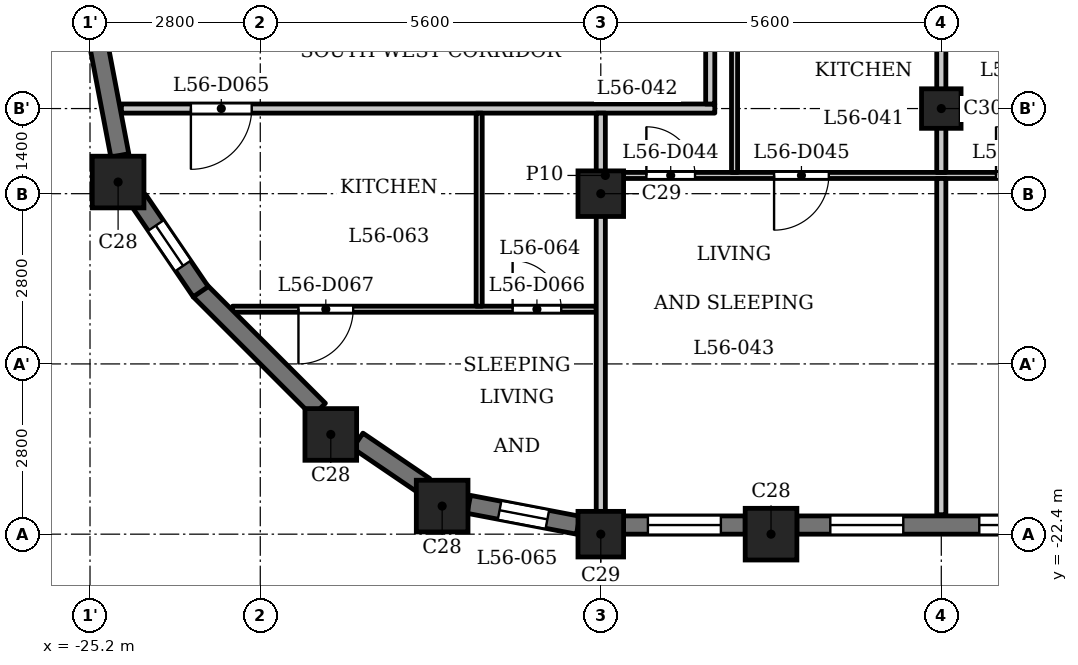
"""IFC4 building model, lengths in metres.
Left out: names, types, materials, properties, quantities, classifications, styles, units other than length and angle.
Written with IfcOpenShell. Run it as: python <this file> out.ifc"""

import sys

from ifc_helpers import new_model, si_unit, direction, frame, frame_2d, origin, origin_2d, place, context, subcontext, project, spatial, rectangle, extrude, element, fill, save


model = new_model("IFC4")
c1 = context("Model", 3, precision=1e-05, world=origin(), true_north=direction((0.0, 1.0)))
c2 = subcontext(c1, "Body", "Model", "MODEL_VIEW")
j1 = project(units=[si_unit("LENGTHUNIT", "METRE"), si_unit("PLANEANGLEUNIT", "RADIAN")], contexts=[c1])
p1 = place(None, origin())
s1 = spatial("IfcSite", under=j1, at=p1, CompositionType="ELEMENT")
p2 = place(p1, origin())
s2 = spatial("IfcBuilding", under=s1, at=p2, CompositionType="ELEMENT")
p3 = place(p2, frame((0.0, 0.0, 216.9)))
s3 = spatial("IfcBuildingStorey", under=s2, at=p3, CompositionType="ELEMENT", Elevation=216.9)
for number, where, z_axis, x_axis in (
    (1, (-19.409, -21.938, 0.0), (0.0, 0.0, 1.0), (1.0, 0.0, 0.0)),
    (2, (-14.0, -22.4, 0.0), (0.0, 0.0, 1.0), (1.0, 0.0, 0.0)),
    (3, (-24.738, -16.609, 0.0), (0.0, 0.0, 1.0), (1.0, 0.0, 0.0)),
    (4, (-21.24, -20.76, 0.0), (0.0, 0.0, 1.0), (1.0, 0.0, 0.0)),
):
    element("IfcColumn", number, at=place(p3, frame(where, z_axis=z_axis, x_axis=x_axis)), inside=s3, PredefinedType="COLUMN", context=c2, shape_type="SweptSolid", body=[
        extrude(rectangle(XDim=0.85, YDim=0.85, at=origin_2d()), origin(), (0.0, 0.0, 1.0), 3.5),
    ])
for number, where, z_axis, x_axis in (
    (5, (-16.8, -22.4, 0.0), (0.0, 0.0, 1.0), (1.0, 0.0, 0.0)),
    (6, (-16.8, -16.8, 0.0), (0.0, 0.0, 1.0), (1.0, 0.0, 0.0)),
):
    element("IfcColumn", number, at=place(p3, frame(where, z_axis=z_axis, x_axis=x_axis)), inside=s3, PredefinedType="COLUMN", context=c2, shape_type="SweptSolid", body=[
        extrude(rectangle(XDim=0.75, YDim=0.75, at=origin_2d()), origin(), (0.0, 0.0, 1.0), 3.5),
    ])
p4 = place(p3, frame((-11.2, -15.4, 0.0), z_axis=(0.0, 0.0, 1.0), x_axis=(1.0, 0.0, 0.0)))
e7 = element("IfcColumn", 7, at=p4, inside=s3, PredefinedType="COLUMN", context=c2, shape_type="SweptSolid", body=[
    extrude(rectangle(XDim=0.65, YDim=0.65, at=origin_2d()), origin(), (0.0, 0.0, 1.0), 3.5),
])
p5 = place(p3, frame((-23.397, -18.391, 0.0), z_axis=(0.0, 0.0, 1.0), x_axis=(0.707106781187, -0.707106781187, 0.0)))
e8 = element("IfcWall", 8, at=p5, inside=s3, PredefinedType="SOLIDWALL", context=c2, shape_type="SweptSolid", body=[
    extrude(rectangle(XDim=2.775, YDim=0.3, at=frame_2d((1.388, 0.0))), origin(), (0.0, 0.0, 1.0), 2.5),
])
p6 = place(p3, frame((-20.796, -20.862, 0.0), z_axis=(0.0, 0.0, 1.0), x_axis=(0.827035970432, -0.562149004813, 0.0)))
e9 = element("IfcWall", 9, at=p6, inside=s3, PredefinedType="SOLIDWALL", context=c2, shape_type="SweptSolid", body=[
    extrude(rectangle(XDim=1.327, YDim=0.3, at=frame_2d((0.664, 0.0))), origin(), (0.0, 0.0, 1.0), 2.5),
])
p7 = place(p3, frame((-18.971, -21.91, 0.0), z_axis=(0.0, 0.0, 1.0), x_axis=(0.982300037503, -0.187314271538, 0.0)))
e10 = element("IfcWall", 10, at=p7, inside=s3, PredefinedType="SOLIDWALL", context=c2, shape_type="SweptSolid", body=[
    extrude(rectangle(XDim=1.831, YDim=0.3, at=frame_2d((0.916, 0.0))), origin(), (0.0, 0.0, 1.0), 2.5),
])
p8 = place(p7, frame((0.516, 0.0, 0.6)))
e11 = element("IfcOpeningElement", 11, at=p8, cuts=e10, PredefinedType="OPENING", context=c2, shape_type="SweptSolid", body=[
    extrude(rectangle(XDim=0.8, YDim=1.55, at=frame_2d((0.4, 0.775))), frame((0.0, 0.16, 0.0), z_axis=(0.0, -1.0, 0.0), x_axis=(1.0, 0.0, 0.0)), (0.0, 0.0, 1.0), 0.32),
])
p9 = place(p3, frame((-16.425, -22.25, 0.0), z_axis=(0.0, 0.0, 1.0), x_axis=(1.0, 0.0, 0.0)))
e12 = element("IfcWall", 12, at=p9, inside=s3, PredefinedType="SOLIDWALL", context=c2, shape_type="SweptSolid", body=[
    extrude(rectangle(XDim=2.0, YDim=0.3, at=frame_2d((1.0, 0.0))), origin(), (0.0, 0.0, 1.0), 2.5),
])
p10 = place(p9, frame((0.4, 0.0, 0.6)))
e13 = element("IfcOpeningElement", 13, at=p10, cuts=e12, PredefinedType="OPENING", context=c2, shape_type="SweptSolid", body=[
    extrude(rectangle(XDim=1.2, YDim=1.55, at=frame_2d((0.6, 0.775))), frame((0.0, 0.16, 0.0), z_axis=(0.0, -1.0, 0.0), x_axis=(1.0, 0.0, 0.0)), (0.0, 0.0, 1.0), 0.32),
])
p11 = place(p3, frame((-13.575, -22.25, 0.0), z_axis=(0.0, 0.0, 1.0), x_axis=(1.0, 0.0, 0.0)))
e14 = element("IfcWall", 14, at=p11, inside=s3, PredefinedType="SOLIDWALL", context=c2, shape_type="SweptSolid", body=[
    extrude(rectangle(XDim=4.75, YDim=0.3, at=frame_2d((2.375, 0.0))), origin(), (0.0, 0.0, 1.0), 2.5),
])
p12 = place(p11, frame((0.55, 0.0, 0.6)))
e15 = element("IfcOpeningElement", 15, at=p12, cuts=e14, PredefinedType="OPENING", context=c2, shape_type="SweptSolid", body=[
    extrude(rectangle(XDim=1.2, YDim=1.55, at=frame_2d((0.6, 0.775))), frame((0.0, 0.16, 0.0), z_axis=(0.0, -1.0, 0.0), x_axis=(1.0, 0.0, 0.0)), (0.0, 0.0, 1.0), 0.32),
])
p13 = place(p11, frame((3.0, 0.0, 0.6)))
e16 = element("IfcOpeningElement", 16, at=p13, cuts=e14, PredefinedType="OPENING", context=c2, shape_type="SweptSolid", body=[
    extrude(rectangle(XDim=1.2, YDim=1.55, at=frame_2d((0.6, 0.775))), frame((0.0, 0.16, 0.0), z_axis=(0.0, -1.0, 0.0), x_axis=(1.0, 0.0, 0.0)), (0.0, 0.0, 1.0), 0.32),
])
p14 = place(p3, frame((-25.053, -14.372, 0.0), z_axis=(0.0, 0.0, 1.0), x_axis=(0.187442908742, -0.982275499014, 0.0)))
e17 = element("IfcWall", 17, at=p14, inside=s3, PredefinedType="SOLIDWALL", context=c2, shape_type="SweptSolid", body=[
    extrude(rectangle(XDim=1.831, YDim=0.3, at=frame_2d((0.916, 0.0))), origin(), (0.0, 0.0, 1.0), 2.5),
])
p15 = place(p3, frame((-24.408, -16.898, 0.0), z_axis=(0.0, 0.0, 1.0), x_axis=(0.562062033417, -0.827095079535, 0.0)))
e18 = element("IfcWall", 18, at=p15, inside=s3, PredefinedType="SOLIDWALL", context=c2, shape_type="SweptSolid", body=[
    extrude(rectangle(XDim=1.831, YDim=0.3, at=frame_2d((0.916, 0.0))), origin(), (0.0, 0.0, 1.0), 2.5),
])
p16 = place(p15, frame((0.516, 0.0, 0.6)))
e19 = element("IfcOpeningElement", 19, at=p16, cuts=e18, PredefinedType="OPENING", context=c2, shape_type="SweptSolid", body=[
    extrude(rectangle(XDim=0.8, YDim=1.55, at=frame_2d((0.4, 0.775))), frame((0.0, 0.16, 0.0), z_axis=(0.0, -1.0, 0.0), x_axis=(1.0, 0.0, 0.0)), (0.0, 0.0, 1.0), 0.32),
])
p17 = place(p3, frame((-22.856, -18.7, 0.0), z_axis=(0.0, 0.0, 1.0), x_axis=(1.0, 0.0, 0.0)))
e20 = element("IfcWall", 20, at=p17, inside=s3, PredefinedType="PARTITIONING", context=c2, shape_type="SweptSolid", body=[
    extrude(rectangle(XDim=5.981, YDim=0.1, at=frame_2d((2.99, 0.0))), origin(), (0.0, 0.0, 1.0), 3.2),
])
p18 = place(p17, frame((4.606, 0.0, 0.0)))
e21 = element("IfcOpeningElement", 21, at=p18, cuts=e20, PredefinedType="OPENING", context=c2, shape_type="SweptSolid", body=[
    extrude(rectangle(XDim=0.8, YDim=2.1, at=frame_2d((0.4, 1.05))), frame((0.0, 0.06, 0.0), z_axis=(0.0, -1.0, 0.0), x_axis=(1.0, 0.0, 0.0)), (0.0, 0.0, 1.0), 0.12),
])
p19 = place(p17, frame((1.084, 0.0, 0.0)))
e22 = element("IfcOpeningElement", 22, at=p19, cuts=e20, PredefinedType="OPENING", context=c2, shape_type="SweptSolid", body=[
    extrude(rectangle(XDim=0.9, YDim=2.1, at=frame_2d((0.45, 1.05))), frame((0.0, 0.06, 0.0), z_axis=(0.0, -1.0, 0.0), x_axis=(1.0, 0.0, 0.0)), (0.0, 0.0, 1.0), 0.12),
])
p20 = place(p3, frame((-16.725, -16.5, 0.0), z_axis=(0.0, 0.0, 1.0), x_axis=(1.0, 0.0, 0.0)))
e23 = element("IfcWall", 23, at=p20, inside=s3, PredefinedType="PARTITIONING", context=c2, shape_type="SweptSolid", body=[
    extrude(rectangle(XDim=33.45, YDim=0.1, at=frame_2d((16.725, 0.0))), origin(), (0.0, 0.0, 1.0), 3.2),
])
p21 = place(p20, frame((0.675, 0.0, 0.0)))
e24 = element("IfcOpeningElement", 24, at=p21, cuts=e23, PredefinedType="OPENING", context=c2, shape_type="SweptSolid", body=[
    extrude(rectangle(XDim=0.8, YDim=2.1, at=frame_2d((0.4, 1.05))), frame((0.0, 0.06, 0.0), z_axis=(0.0, -1.0, 0.0), x_axis=(1.0, 0.0, 0.0)), (0.0, 0.0, 1.0), 0.12),
])
p22 = place(p20, frame((2.775, 0.0, 0.0)))
e25 = element("IfcOpeningElement", 25, at=p22, cuts=e23, PredefinedType="OPENING", context=c2, shape_type="SweptSolid", body=[
    extrude(rectangle(XDim=0.9, YDim=2.1, at=frame_2d((0.45, 1.05))), frame((0.0, 0.06, 0.0), z_axis=(0.0, -1.0, 0.0), x_axis=(1.0, 0.0, 0.0)), (0.0, 0.0, 1.0), 0.12),
])
p23 = place(p20, frame((6.425, 0.0, 0.0)))
e26 = element("IfcOpeningElement", 26, at=p23, cuts=e23, PredefinedType="OPENING", context=c2, shape_type="SweptSolid", body=[
    extrude(rectangle(XDim=0.8, YDim=2.1, at=frame_2d((0.4, 1.05))), frame((0.0, 0.06, 0.0), z_axis=(0.0, -1.0, 0.0), x_axis=(1.0, 0.0, 0.0)), (0.0, 0.0, 1.0), 0.12),
])
p24 = place(p20, frame((8.775, 0.0, 0.0)))
e27 = element("IfcOpeningElement", 27, at=p24, cuts=e23, PredefinedType="OPENING", context=c2, shape_type="SweptSolid", body=[
    extrude(rectangle(XDim=0.9, YDim=2.1, at=frame_2d((0.45, 1.05))), frame((0.0, 0.06, 0.0), z_axis=(0.0, -1.0, 0.0), x_axis=(1.0, 0.0, 0.0)), (0.0, 0.0, 1.0), 0.12),
])
p25 = place(p20, frame((12.525, 0.0, 0.0)))
e28 = element("IfcOpeningElement", 28, at=p25, cuts=e23, PredefinedType="OPENING", context=c2, shape_type="SweptSolid", body=[
    extrude(rectangle(XDim=0.9, YDim=2.1, at=frame_2d((0.45, 1.05))), frame((0.0, 0.06, 0.0), z_axis=(0.0, -1.0, 0.0), x_axis=(1.0, 0.0, 0.0)), (0.0, 0.0, 1.0), 0.12),
])
p26 = place(p20, frame((14.775, 0.0, 0.0)))
e29 = element("IfcOpeningElement", 29, at=p26, cuts=e23, PredefinedType="OPENING", context=c2, shape_type="SweptSolid", body=[
    extrude(rectangle(XDim=0.9, YDim=2.1, at=frame_2d((0.45, 1.05))), frame((0.0, 0.06, 0.0), z_axis=(0.0, -1.0, 0.0), x_axis=(1.0, 0.0, 0.0)), (0.0, 0.0, 1.0), 0.12),
])
p27 = place(p20, frame((25.475, 0.0, 0.0)))
e30 = element("IfcOpeningElement", 30, at=p27, cuts=e23, PredefinedType="OPENING", context=c2, shape_type="SweptSolid", body=[
    extrude(rectangle(XDim=0.8, YDim=2.1, at=frame_2d((0.4, 1.05))), frame((0.0, 0.06, 0.0), z_axis=(0.0, -1.0, 0.0), x_axis=(1.0, 0.0, 0.0)), (0.0, 0.0, 1.0), 0.12),
])
p28 = place(p20, frame((23.225, 0.0, 0.0)))
e31 = element("IfcOpeningElement", 31, at=p28, cuts=e23, PredefinedType="OPENING", context=c2, shape_type="SweptSolid", body=[
    extrude(rectangle(XDim=0.9, YDim=2.1, at=frame_2d((0.45, 1.05))), frame((0.0, 0.06, 0.0), z_axis=(0.0, -1.0, 0.0), x_axis=(1.0, 0.0, 0.0)), (0.0, 0.0, 1.0), 0.12),
])
p29 = place(p20, frame((17.875, 0.0, 0.0)))
e32 = element("IfcOpeningElement", 32, at=p29, cuts=e23, PredefinedType="OPENING", context=c2, shape_type="SweptSolid", body=[
    extrude(rectangle(XDim=0.9, YDim=2.1, at=frame_2d((0.45, 1.05))), frame((0.0, 0.06, 0.0), z_axis=(0.0, -1.0, 0.0), x_axis=(1.0, 0.0, 0.0)), (0.0, 0.0, 1.0), 0.12),
])
p30 = place(p20, frame((19.975, 0.0, 0.0)))
e33 = element("IfcOpeningElement", 33, at=p30, cuts=e23, PredefinedType="OPENING", context=c2, shape_type="SweptSolid", body=[
    extrude(rectangle(XDim=0.9, YDim=2.1, at=frame_2d((0.45, 1.05))), frame((0.0, 0.06, 0.0), z_axis=(0.0, -1.0, 0.0), x_axis=(1.0, 0.0, 0.0)), (0.0, 0.0, 1.0), 0.12),
])
p31 = place(p20, frame((30.825, 0.0, 0.0)))
e34 = element("IfcOpeningElement", 34, at=p31, cuts=e23, PredefinedType="OPENING", context=c2, shape_type="SweptSolid", body=[
    extrude(rectangle(XDim=0.8, YDim=2.1, at=frame_2d((0.4, 1.05))), frame((0.0, 0.06, 0.0), z_axis=(0.0, -1.0, 0.0), x_axis=(1.0, 0.0, 0.0)), (0.0, 0.0, 1.0), 0.12),
])
p32 = place(p20, frame((29.075, 0.0, 0.0)))
e35 = element("IfcOpeningElement", 35, at=p32, cuts=e23, PredefinedType="OPENING", context=c2, shape_type="SweptSolid", body=[
    extrude(rectangle(XDim=0.9, YDim=2.1, at=frame_2d((0.45, 1.05))), frame((0.0, 0.06, 0.0), z_axis=(0.0, -1.0, 0.0), x_axis=(1.0, 0.0, 0.0)), (0.0, 0.0, 1.0), 0.12),
])
p33 = place(p3, frame((-24.684, -15.4, 0.0), z_axis=(0.0, 0.0, 1.0), x_axis=(1.0, 0.0, 0.0)))
e36 = element("IfcWall", 36, at=p33, inside=s3, PredefinedType="PARTITIONING", context=c2, shape_type="SweptSolid", body=[
    extrude(rectangle(XDim=9.759, YDim=0.15, at=frame_2d((4.879, 0.0))), origin(), (0.0, 0.0, 1.0), 3.2),
])
p34 = place(p33, frame((1.143, 0.0, 0.0)))
e37 = element("IfcOpeningElement", 37, at=p34, cuts=e36, PredefinedType="OPENING", context=c2, shape_type="SweptSolid", body=[
    extrude(rectangle(XDim=1.0, YDim=2.1, at=frame_2d((0.5, 1.05))), frame((0.0, 0.085, 0.0), z_axis=(0.0, -1.0, 0.0), x_axis=(1.0, 0.0, 0.0)), (0.0, 0.0, 1.0), 0.17),
])
p35 = place(p3, frame((-18.8, -18.65, 0.0), z_axis=(0.0, 0.0, 1.0), x_axis=(0.0, 1.0, 0.0)))
e38 = element("IfcWall", 38, at=p35, inside=s3, PredefinedType="PARTITIONING", context=c2, shape_type="SweptSolid", body=[
    extrude(rectangle(XDim=3.175, YDim=0.1, at=frame_2d((1.587, 0.0))), origin(), (0.0, 0.0, 1.0), 3.2),
])
p36 = place(p3, frame((-16.8, -22.31, 0.0), z_axis=(0.0, 0.0, 1.0), x_axis=(0.0, 1.0, 0.0)))
e39 = element("IfcWall", 39, at=p36, inside=s3, PredefinedType="PARTITIONING", context=c2, shape_type="SweptSolid", body=[
    extrude(rectangle(XDim=6.835, YDim=0.15, at=frame_2d((3.417, 0.0))), origin(), (0.0, 0.0, 1.0), 2.55),
])
p37 = place(p3, frame((-15.0, -15.325, 0.0), z_axis=(0.0, 0.0, 1.0), x_axis=(0.0, 1.0, 0.0)))
e40 = element("IfcWall", 40, at=p37, inside=s3, PredefinedType="PARTITIONING", context=c2, shape_type="SweptSolid", body=[
    extrude(rectangle(XDim=2.05, YDim=0.15, at=frame_2d((1.025, 0.0))), origin(), (0.0, 0.0, 1.0), 3.2),
])
p38 = place(p3, frame((-14.6, -16.45, 0.0), z_axis=(0.0, 0.0, 1.0), x_axis=(0.0, 1.0, 0.0)))
e41 = element("IfcWall", 41, at=p38, inside=s3, PredefinedType="PARTITIONING", context=c2, shape_type="SweptSolid", body=[
    extrude(rectangle(XDim=3.175, YDim=0.1, at=frame_2d((1.587, 0.0))), origin(), (0.0, 0.0, 1.0), 3.2),
])
p39 = place(p3, frame((-11.2, -22.08, 0.0), z_axis=(0.0, 0.0, 1.0), x_axis=(0.0, 1.0, 0.0)))
e42 = element("IfcWall", 42, at=p39, inside=s3, PredefinedType="PARTITIONING", context=c2, shape_type="SweptSolid", body=[
    extrude(rectangle(XDim=5.53, YDim=0.15, at=frame_2d((2.765, 0.0))), origin(), (0.0, 0.0, 1.0), 3.2),
])
p40 = place(p3, frame((-11.2, -16.45, 0.0), z_axis=(0.0, 0.0, 1.0), x_axis=(0.0, 1.0, 0.0)))
e43 = element("IfcWall", 43, at=p40, inside=s3, PredefinedType="PARTITIONING", context=c2, shape_type="SweptSolid", body=[
    extrude(rectangle(XDim=3.175, YDim=0.15, at=frame_2d((1.587, 0.0))), origin(), (0.0, 0.0, 1.0), 3.2),
])
p41 = place(p21, origin())
e44 = element("IfcDoor", 44, at=p41, inside=s3, OperationType="SINGLE_SWING_RIGHT", PredefinedType="DOOR", context=c2, shape_type="SweptSolid", body=[
    extrude(rectangle(XDim=0.8, YDim=2.1, at=frame_2d((0.4, 1.05))), frame((0.0, 0.025, 0.0), z_axis=(0.0, -1.0, 0.0), x_axis=(1.0, 0.0, 0.0)), (0.0, 0.0, 1.0), 0.05),
])
fill(e24, e44)
p42 = place(p22, origin())
e45 = element("IfcDoor", 45, at=p42, inside=s3, OperationType="SINGLE_SWING_LEFT", PredefinedType="DOOR", context=c2, shape_type="SweptSolid", body=[
    extrude(rectangle(XDim=0.9, YDim=2.1, at=frame_2d((0.45, 1.05))), frame((0.0, 0.025, 0.0), z_axis=(0.0, -1.0, 0.0), x_axis=(1.0, 0.0, 0.0)), (0.0, 0.0, 1.0), 0.05),
])
fill(e25, e45)
p43 = place(p23, origin())
e46 = element("IfcDoor", 46, at=p43, inside=s3, OperationType="SINGLE_SWING_RIGHT", PredefinedType="DOOR", context=c2, shape_type="SweptSolid", body=[
    extrude(rectangle(XDim=0.8, YDim=2.1, at=frame_2d((0.4, 1.05))), frame((0.0, 0.025, 0.0), z_axis=(0.0, -1.0, 0.0), x_axis=(1.0, 0.0, 0.0)), (0.0, 0.0, 1.0), 0.05),
])
fill(e26, e46)
p44 = place(p34, origin())
e47 = element("IfcDoor", 47, at=p44, inside=s3, OperationType="SINGLE_SWING_LEFT", PredefinedType="DOOR", context=c2, shape_type="SweptSolid", body=[
    extrude(rectangle(XDim=1.0, YDim=2.1, at=frame_2d((0.5, 1.05))), frame((0.0, 0.025, 0.0), z_axis=(0.0, -1.0, 0.0), x_axis=(1.0, 0.0, 0.0)), (0.0, 0.0, 1.0), 0.05),
])
fill(e37, e47)
p45 = place(p18, origin())
e48 = element("IfcDoor", 48, at=p45, inside=s3, OperationType="SINGLE_SWING_RIGHT", PredefinedType="DOOR", context=c2, shape_type="SweptSolid", body=[
    extrude(rectangle(XDim=0.8, YDim=2.1, at=frame_2d((0.4, 1.05))), frame((0.0, 0.025, 0.0), z_axis=(0.0, -1.0, 0.0), x_axis=(1.0, 0.0, 0.0)), (0.0, 0.0, 1.0), 0.05),
])
fill(e21, e48)
p46 = place(p19, origin())
e49 = element("IfcDoor", 49, at=p46, inside=s3, OperationType="SINGLE_SWING_LEFT", PredefinedType="DOOR", context=c2, shape_type="SweptSolid", body=[
    extrude(rectangle(XDim=0.9, YDim=2.1, at=frame_2d((0.45, 1.05))), frame((0.0, 0.025, 0.0), z_axis=(0.0, -1.0, 0.0), x_axis=(1.0, 0.0, 0.0)), (0.0, 0.0, 1.0), 0.05),
])
fill(e22, e49)
p47 = place(p8, origin())
e50 = element("IfcWindow", 50, at=p47, inside=s3, PartitioningType="SINGLE_PANEL", PredefinedType="WINDOW", context=c2, shape_type="SweptSolid", body=[
    extrude(rectangle(XDim=0.8, YDim=1.55, at=frame_2d((0.4, 0.775))), frame((0.0, 0.03, 0.0), z_axis=(0.0, -1.0, 0.0), x_axis=(1.0, 0.0, 0.0)), (0.0, 0.0, 1.0), 0.06),
])
fill(e11, e50)
p48 = place(p10, origin())
e51 = element("IfcWindow", 51, at=p48, inside=s3, PartitioningType="SINGLE_PANEL", PredefinedType="WINDOW", context=c2, shape_type="SweptSolid", body=[
    extrude(rectangle(XDim=1.2, YDim=1.55, at=frame_2d((0.6, 0.775))), frame((0.0, 0.03, 0.0), z_axis=(0.0, -1.0, 0.0), x_axis=(1.0, 0.0, 0.0)), (0.0, 0.0, 1.0), 0.06),
])
fill(e13, e51)
p49 = place(p12, origin())
e52 = element("IfcWindow", 52, at=p49, inside=s3, PartitioningType="SINGLE_PANEL", PredefinedType="WINDOW", context=c2, shape_type="SweptSolid", body=[
    extrude(rectangle(XDim=1.2, YDim=1.55, at=frame_2d((0.6, 0.775))), frame((0.0, 0.03, 0.0), z_axis=(0.0, -1.0, 0.0), x_axis=(1.0, 0.0, 0.0)), (0.0, 0.0, 1.0), 0.06),
])
fill(e15, e52)
p50 = place(p13, origin())
e53 = element("IfcWindow", 53, at=p50, inside=s3, PartitioningType="SINGLE_PANEL", PredefinedType="WINDOW", context=c2, shape_type="SweptSolid", body=[
    extrude(rectangle(XDim=1.2, YDim=1.55, at=frame_2d((0.6, 0.775))), frame((0.0, 0.03, 0.0), z_axis=(0.0, -1.0, 0.0), x_axis=(1.0, 0.0, 0.0)), (0.0, 0.0, 1.0), 0.06),
])
fill(e16, e53)
p51 = place(p16, origin())
e54 = element("IfcWindow", 54, at=p51, inside=s3, PartitioningType="SINGLE_PANEL", PredefinedType="WINDOW", context=c2, shape_type="SweptSolid", body=[
    extrude(rectangle(XDim=0.8, YDim=1.55, at=frame_2d((0.4, 0.775))), frame((0.0, 0.03, 0.0), z_axis=(0.0, -1.0, 0.0), x_axis=(1.0, 0.0, 0.0)), (0.0, 0.0, 1.0), 0.06),
])
fill(e19, e54)
save(model, sys.argv[1])
